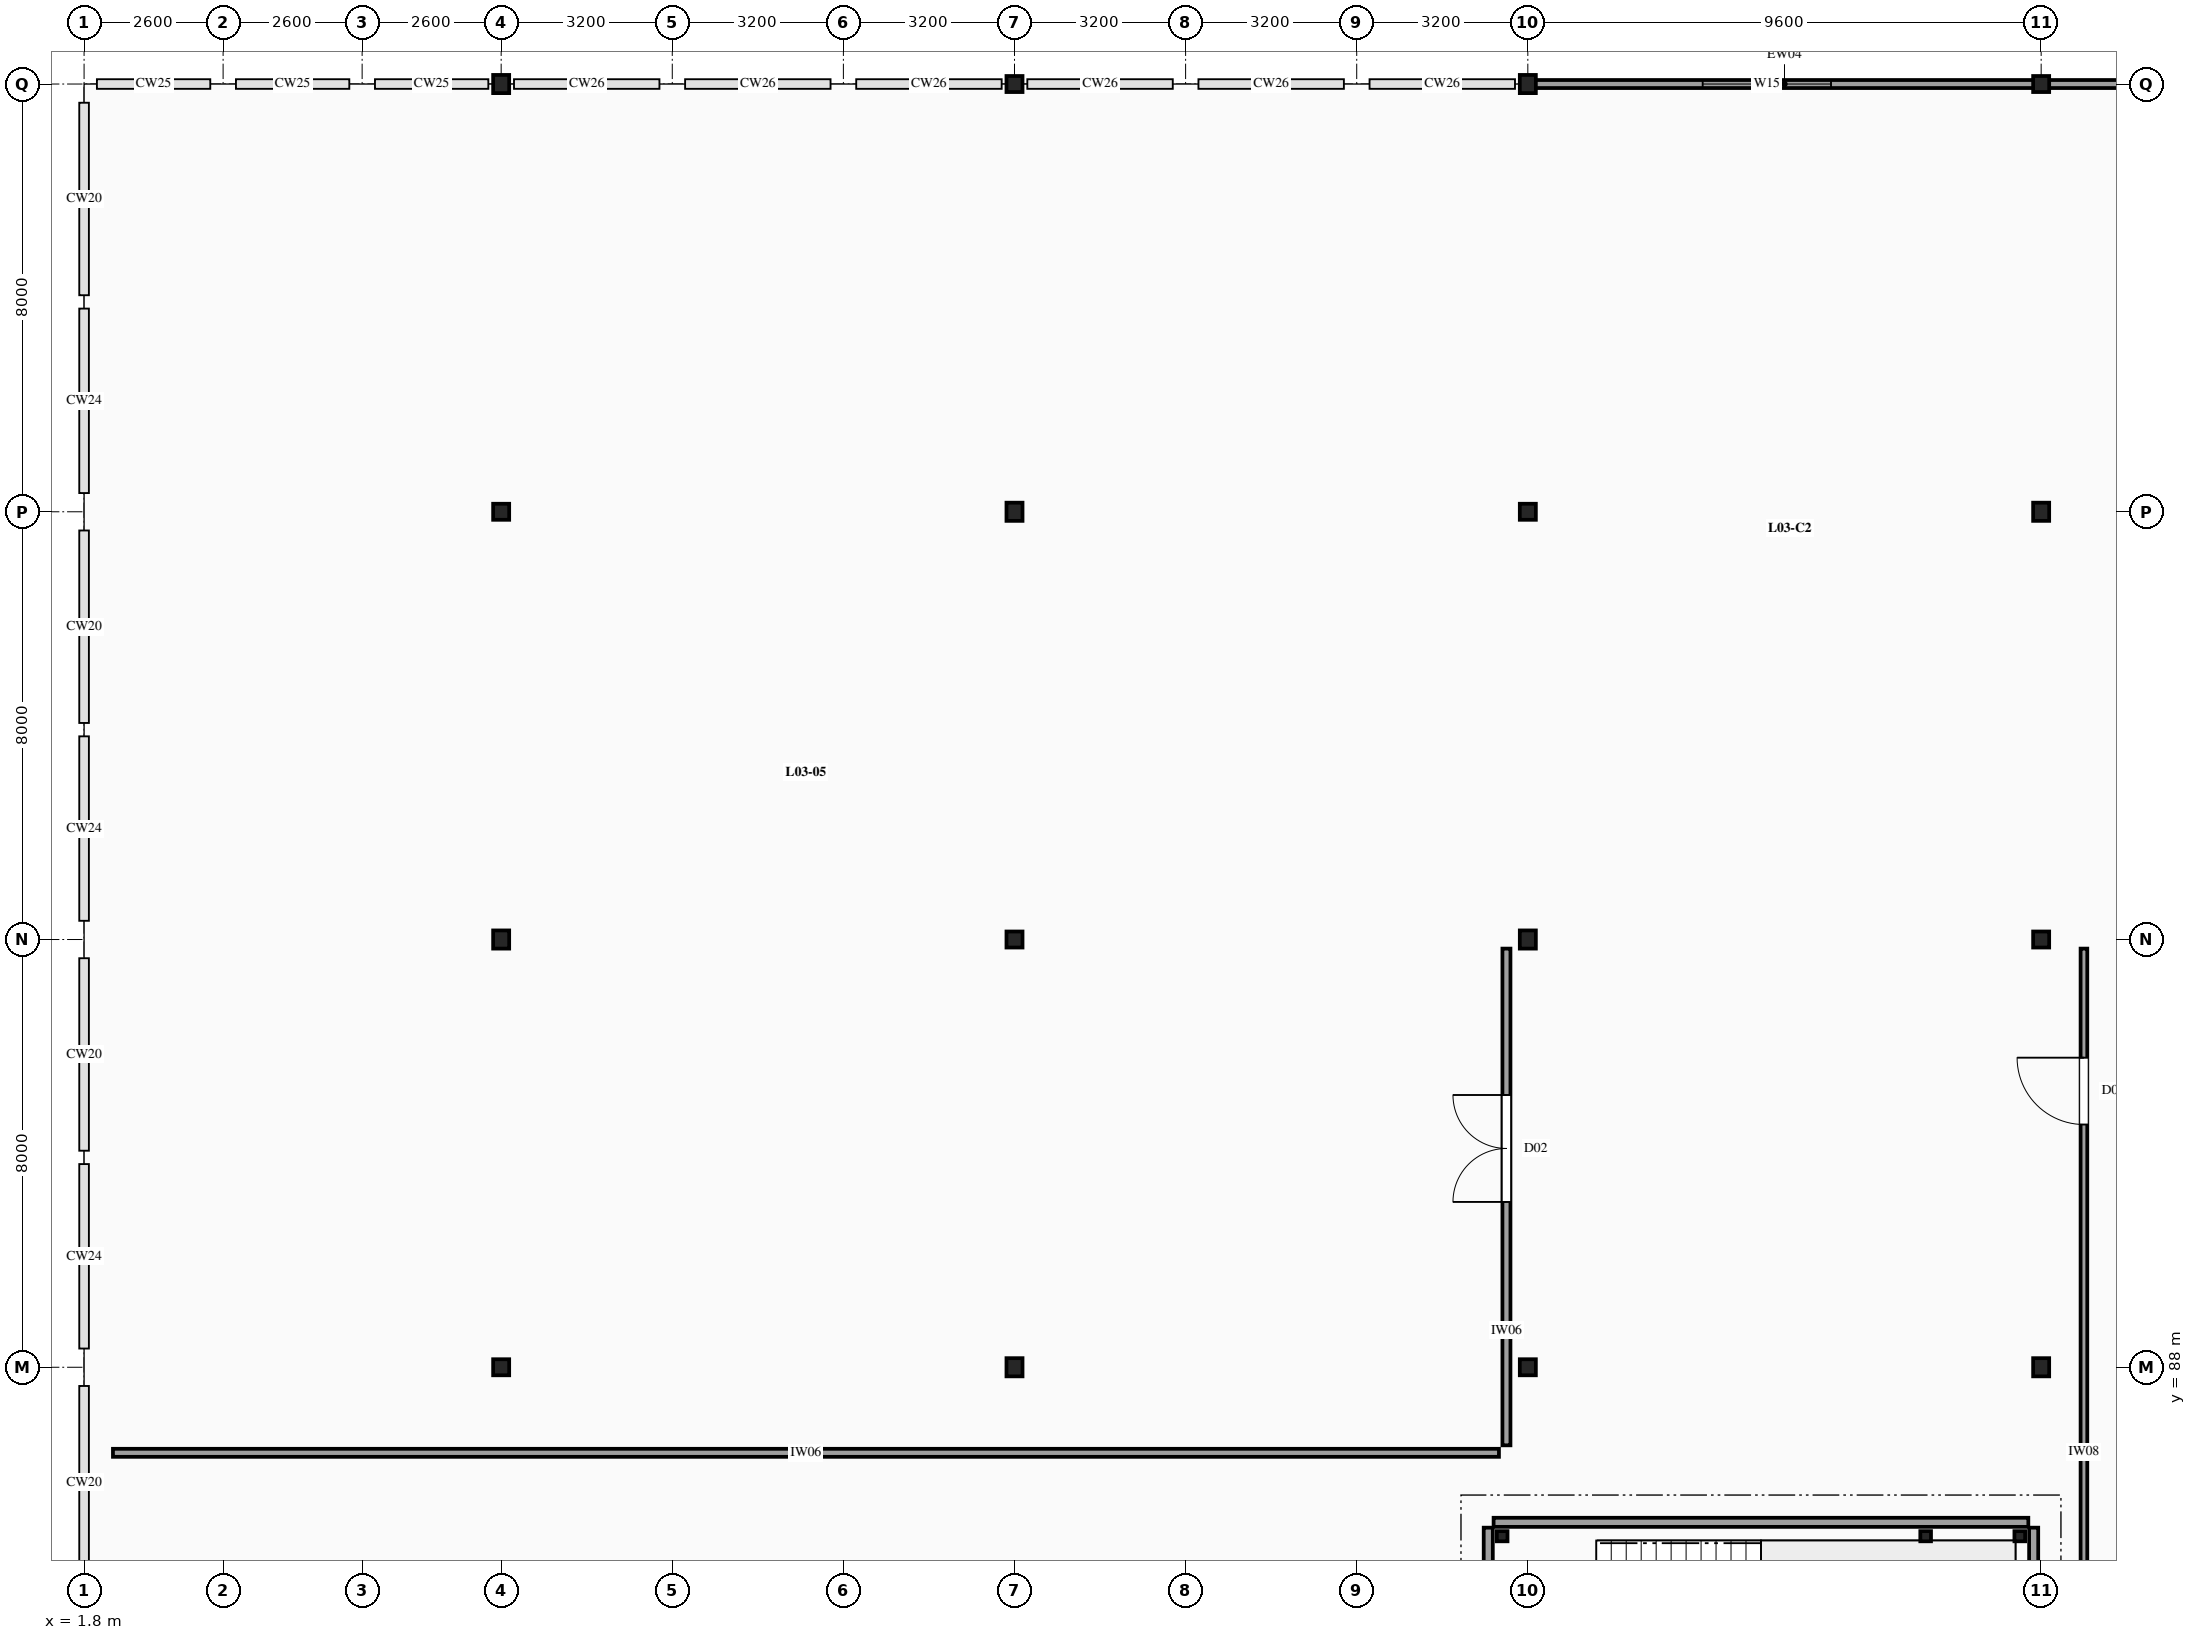
"""IFC4 building model, lengths in metres.
Left out: names, types, materials, properties, quantities, classifications, styles, units other than length and angle.
Written with IfcOpenShell. Run it as: python <this file> out.ifc"""

import sys

from ifc_helpers import new_model, si_unit, direction, frame, frame_2d, origin, origin_2d, place, context, subcontext, project, spatial, rectangle, i_section, extrude, element, fill, save


model = new_model("IFC4")
c1 = context("Model", 3, precision=1e-05, world=origin(), true_north=direction((0.0, 1.0)))
c2 = subcontext(c1, "Body", "Model", "MODEL_VIEW")
j1 = project(units=[si_unit("LENGTHUNIT", "METRE"), si_unit("PLANEANGLEUNIT", "RADIAN")], contexts=[c1])
p1 = place(None, origin())
s1 = spatial("IfcSite", under=j1, at=p1, CompositionType="ELEMENT")
p2 = place(p1, origin())
s2 = spatial("IfcBuilding", under=s1, at=p2, CompositionType="ELEMENT")
p3 = place(p2, frame((0.0, 0.0, 12.9)))
s3 = spatial("IfcBuildingStorey", under=s2, at=p3, CompositionType="ELEMENT", Elevation=12.9)
p4 = place(p3, frame((9.6, 88.0, -0.26), z_axis=(0.0, 0.0, 1.0), x_axis=(1.0, 0.0, 0.0)))
e1 = element("IfcColumn", 1, at=p4, inside=s3, PredefinedType="COLUMN", context=c2, shape_type="SweptSolid", body=[
    extrude(i_section(OverallWidth=0.3, OverallDepth=0.3, WebThickness=0.011, FlangeThickness=0.019, FilletRadius=0.027, at=origin_2d()), origin(), (0.0, 0.0, 1.0), 4.48),
])
p5 = place(p3, frame((9.6, 96.0, -0.26), z_axis=(0.0, 0.0, 1.0), x_axis=(1.0, 0.0, 0.0)))
e2 = element("IfcColumn", 2, at=p5, inside=s3, PredefinedType="COLUMN", context=c2, shape_type="SweptSolid", body=[
    extrude(i_section(OverallWidth=0.3, OverallDepth=0.34, WebThickness=0.012, FlangeThickness=0.021, FilletRadius=0.027, at=origin_2d()), origin(), (0.0, 0.0, 1.0), 4.48),
])
p6 = place(p3, frame((9.6, 104.0, -0.26), z_axis=(0.0, 0.0, 1.0), x_axis=(1.0, 0.0, 0.0)))
e3 = element("IfcColumn", 3, at=p6, inside=s3, PredefinedType="COLUMN", context=c2, shape_type="SweptSolid", body=[
    extrude(i_section(OverallWidth=0.3, OverallDepth=0.3, WebThickness=0.011, FlangeThickness=0.019, FilletRadius=0.027, at=origin_2d()), origin(), (0.0, 0.0, 1.0), 4.48),
])
for number, where, z_axis, x_axis in (
    (4, (9.6, 112.0, -0.26), (0.0, 0.0, 1.0), (1.0, 0.0, 0.0)),
    (5, (19.2, 88.0, -0.26), (0.0, 0.0, 1.0), (1.0, 0.0, 0.0)),
):
    element("IfcColumn", number, at=place(p3, frame(where, z_axis=z_axis, x_axis=x_axis)), inside=s3, PredefinedType="COLUMN", context=c2, shape_type="SweptSolid", body=[
        extrude(i_section(OverallWidth=0.3, OverallDepth=0.34, WebThickness=0.012, FlangeThickness=0.021, FilletRadius=0.027, at=origin_2d()), origin(), (0.0, 0.0, 1.0), 4.48),
    ])
p7 = place(p3, frame((19.2, 96.0, -0.26), z_axis=(0.0, 0.0, 1.0), x_axis=(1.0, 0.0, 0.0)))
e6 = element("IfcColumn", 6, at=p7, inside=s3, PredefinedType="COLUMN", context=c2, shape_type="SweptSolid", body=[
    extrude(i_section(OverallWidth=0.3, OverallDepth=0.3, WebThickness=0.011, FlangeThickness=0.019, FilletRadius=0.027, at=origin_2d()), origin(), (0.0, 0.0, 1.0), 4.48),
])
p8 = place(p3, frame((19.2, 104.0, -0.26), z_axis=(0.0, 0.0, 1.0), x_axis=(1.0, 0.0, 0.0)))
e7 = element("IfcColumn", 7, at=p8, inside=s3, PredefinedType="COLUMN", context=c2, shape_type="SweptSolid", body=[
    extrude(i_section(OverallWidth=0.3, OverallDepth=0.34, WebThickness=0.012, FlangeThickness=0.021, FilletRadius=0.027, at=origin_2d()), origin(), (0.0, 0.0, 1.0), 4.48),
])
for number, where, z_axis, x_axis in (
    (8, (19.2, 112.0, -0.26), (0.0, 0.0, 1.0), (1.0, 0.0, 0.0)),
    (9, (28.8, 88.0, -0.26), (0.0, 0.0, 1.0), (1.0, 0.0, 0.0)),
):
    element("IfcColumn", number, at=place(p3, frame(where, z_axis=z_axis, x_axis=x_axis)), inside=s3, PredefinedType="COLUMN", context=c2, shape_type="SweptSolid", body=[
        extrude(i_section(OverallWidth=0.3, OverallDepth=0.3, WebThickness=0.011, FlangeThickness=0.019, FilletRadius=0.027, at=origin_2d()), origin(), (0.0, 0.0, 1.0), 4.48),
    ])
p9 = place(p3, frame((28.8, 96.0, -0.26), z_axis=(0.0, 0.0, 1.0), x_axis=(1.0, 0.0, 0.0)))
e10 = element("IfcColumn", 10, at=p9, inside=s3, PredefinedType="COLUMN", context=c2, shape_type="SweptSolid", body=[
    extrude(i_section(OverallWidth=0.3, OverallDepth=0.34, WebThickness=0.012, FlangeThickness=0.021, FilletRadius=0.027, at=origin_2d()), origin(), (0.0, 0.0, 1.0), 4.48),
])
p10 = place(p3, frame((28.8, 104.0, -0.26), z_axis=(0.0, 0.0, 1.0), x_axis=(1.0, 0.0, 0.0)))
e11 = element("IfcColumn", 11, at=p10, inside=s3, PredefinedType="COLUMN", context=c2, shape_type="SweptSolid", body=[
    extrude(i_section(OverallWidth=0.3, OverallDepth=0.3, WebThickness=0.011, FlangeThickness=0.019, FilletRadius=0.027, at=origin_2d()), origin(), (0.0, 0.0, 1.0), 4.48),
])
for number, where, z_axis, x_axis in (
    (12, (28.8, 112.0, -0.26), (0.0, 0.0, 1.0), (1.0, 0.0, 0.0)),
    (13, (38.4, 88.0, -0.26), (0.0, 0.0, 1.0), (1.0, 0.0, 0.0)),
):
    element("IfcColumn", number, at=place(p3, frame(where, z_axis=z_axis, x_axis=x_axis)), inside=s3, PredefinedType="COLUMN", context=c2, shape_type="SweptSolid", body=[
        extrude(i_section(OverallWidth=0.3, OverallDepth=0.34, WebThickness=0.012, FlangeThickness=0.021, FilletRadius=0.027, at=origin_2d()), origin(), (0.0, 0.0, 1.0), 4.48),
    ])
p11 = place(p3, frame((38.4, 96.0, -0.26), z_axis=(0.0, 0.0, 1.0), x_axis=(1.0, 0.0, 0.0)))
e14 = element("IfcColumn", 14, at=p11, inside=s3, PredefinedType="COLUMN", context=c2, shape_type="SweptSolid", body=[
    extrude(i_section(OverallWidth=0.3, OverallDepth=0.3, WebThickness=0.011, FlangeThickness=0.019, FilletRadius=0.027, at=origin_2d()), origin(), (0.0, 0.0, 1.0), 4.48),
])
p12 = place(p3, frame((38.4, 104.0, -0.26), z_axis=(0.0, 0.0, 1.0), x_axis=(1.0, 0.0, 0.0)))
e15 = element("IfcColumn", 15, at=p12, inside=s3, PredefinedType="COLUMN", context=c2, shape_type="SweptSolid", body=[
    extrude(i_section(OverallWidth=0.3, OverallDepth=0.34, WebThickness=0.012, FlangeThickness=0.021, FilletRadius=0.027, at=origin_2d()), origin(), (0.0, 0.0, 1.0), 4.48),
])
p13 = place(p3, frame((38.4, 112.0, -0.26), z_axis=(0.0, 0.0, 1.0), x_axis=(1.0, 0.0, 0.0)))
e16 = element("IfcColumn", 16, at=p13, inside=s3, PredefinedType="COLUMN", context=c2, shape_type="SweptSolid", body=[
    extrude(i_section(OverallWidth=0.3, OverallDepth=0.3, WebThickness=0.011, FlangeThickness=0.019, FilletRadius=0.027, at=origin_2d()), origin(), (0.0, 0.0, 1.0), 4.48),
])
for number, where, z_axis, x_axis in (
    (17, (38.0, 84.84, 0.0), (0.0, 0.0, 1.0), (1.0, 0.0, 0.0)),
    (18, (28.32, 84.84, 0.0), (0.0, 0.0, 1.0), (1.0, 0.0, 0.0)),
    (19, (36.24, 84.84, 0.0), (0.0, 0.0, 1.0), (1.0, 0.0, 0.0)),
):
    element("IfcColumn", number, at=place(p3, frame(where, z_axis=z_axis, x_axis=x_axis)), inside=s3, PredefinedType="COLUMN", context=c2, shape_type="SweptSolid", body=[
        extrude(i_section(OverallWidth=0.2, OverallDepth=0.19, WebThickness=0.007, FlangeThickness=0.01, FilletRadius=0.018, at=origin_2d()), origin(), (0.0, 0.0, 1.0), 4.5),
    ])
p14 = place(p3, frame((28.82, 112.0, 0.0), z_axis=(0.0, 0.0, 1.0), x_axis=(1.0, 0.0, 0.0)))
e20 = element("IfcWall", 20, at=p14, inside=s3, PredefinedType="SOLIDWALL", context=c2, shape_type="SweptSolid", body=[
    extrude(rectangle(XDim=9.56, YDim=0.15, at=frame_2d((4.78, 0.0))), origin(), (0.0, 0.0, 1.0), 3.54),
])
p15 = place(p14, frame((3.25, 0.0, 0.95)))
e21 = element("IfcOpeningElement", 21, at=p15, cuts=e20, PredefinedType="OPENING", context=c2, shape_type="SweptSolid", body=[
    extrude(rectangle(XDim=2.4, YDim=2.2, at=frame_2d((1.2, 1.1))), frame((0.0, 0.085, 0.0), z_axis=(0.0, -1.0, 0.0), x_axis=(1.0, 0.0, 0.0)), (0.0, 0.0, 1.0), 0.17),
])
p16 = place(p3, frame((38.42, 112.0, 0.0), z_axis=(0.0, 0.0, 1.0), x_axis=(1.0, 0.0, 0.0)))
e22 = element("IfcWall", 22, at=p16, inside=s3, PredefinedType="SOLIDWALL", context=c2, shape_type="SweptSolid", body=[
    extrude(rectangle(XDim=9.56, YDim=0.15, at=frame_2d((4.78, 0.0))), origin(), (0.0, 0.0, 1.0), 3.54),
])
p17 = place(p3, frame((28.06, 80.96, 0.0), z_axis=(0.0, 0.0, 1.0), x_axis=(0.0, 1.0, 0.0)))
e23 = element("IfcWall", 23, at=p17, inside=s3, PredefinedType="SOLIDWALL", context=c2, shape_type="SweptSolid", body=[
    extrude(rectangle(XDim=4.04, YDim=0.17, at=frame_2d((2.02, 0.0))), origin(), (0.0, 0.0, 1.0), 3.38),
])
p18 = place(p17, frame((1.27, 0.0, 0.0)))
e24 = element("IfcOpeningElement", 24, at=p18, cuts=e23, PredefinedType="OPENING", context=c2, shape_type="SweptSolid", body=[
    extrude(rectangle(XDim=1.5, YDim=2.2, at=frame_2d((0.75, 1.1))), frame((0.0, 0.095, 0.0), z_axis=(0.0, -1.0, 0.0), x_axis=(1.0, 0.0, 0.0)), (0.0, 0.0, 1.0), 0.19),
])
p19 = place(p3, frame((38.26, 80.96, 0.0), z_axis=(0.0, 0.0, 1.0), x_axis=(0.0, 1.0, 0.0)))
e25 = element("IfcWall", 25, at=p19, inside=s3, PredefinedType="SOLIDWALL", context=c2, shape_type="SweptSolid", body=[
    extrude(rectangle(XDim=4.04, YDim=0.17, at=frame_2d((2.02, 0.0))), origin(), (0.0, 0.0, 1.0), 3.38),
])
p20 = place(p3, frame((28.16, 85.1, 0.0), z_axis=(0.0, 0.0, 1.0), x_axis=(1.0, 0.0, 0.0)))
e26 = element("IfcWall", 26, at=p20, inside=s3, PredefinedType="SOLIDWALL", context=c2, shape_type="SweptSolid", body=[
    extrude(rectangle(XDim=10.0, YDim=0.17, at=frame_2d((5.0, 0.0))), origin(), (0.0, 0.0, 1.0), 3.38),
])
p21 = place(p3, frame((2.34, 86.4, 0.0), z_axis=(0.0, 0.0, 1.0), x_axis=(1.0, 0.0, 0.0)))
e27 = element("IfcWall", 27, at=p21, inside=s3, PredefinedType="PARTITIONING", context=c2, shape_type="SweptSolid", body=[
    extrude(rectangle(XDim=25.92, YDim=0.15, at=frame_2d((12.96, 0.0))), origin(), (0.0, 0.0, 1.0), 3.38),
])
p22 = place(p3, frame((28.4, 86.54, 0.0), z_axis=(0.0, 0.0, 1.0), x_axis=(0.0, 1.0, 0.0)))
e28 = element("IfcWall", 28, at=p22, inside=s3, PredefinedType="PARTITIONING", context=c2, shape_type="SweptSolid", body=[
    extrude(rectangle(XDim=9.29, YDim=0.15, at=frame_2d((4.645, 0.0))), origin(), (0.0, 0.0, 1.0), 3.38),
])
p23 = place(p22, frame((4.552, 0.0, 0.0)))
e29 = element("IfcOpeningElement", 29, at=p23, cuts=e28, PredefinedType="OPENING", context=c2, shape_type="SweptSolid", body=[
    extrude(rectangle(XDim=2.0, YDim=2.6, at=frame_2d((1.0, 1.3))), frame((0.0, 0.085, 0.0), z_axis=(0.0, -1.0, 0.0), x_axis=(1.0, 0.0, 0.0)), (0.0, 0.0, 1.0), 0.17),
])
p24 = place(p3, frame((39.2, 80.54, 0.0), z_axis=(0.0, 0.0, 1.0), x_axis=(0.0, 1.0, 0.0)))
e30 = element("IfcWall", 30, at=p24, inside=s3, PredefinedType="PARTITIONING", context=c2, shape_type="SweptSolid", body=[
    extrude(rectangle(XDim=15.29, YDim=0.125, at=frame_2d((7.645, 0.0))), origin(), (0.0, 0.0, 1.0), 3.38),
])
p25 = place(p24, frame((12.0, 0.0, 0.0)))
e31 = element("IfcOpeningElement", 31, at=p25, cuts=e30, PredefinedType="OPENING", context=c2, shape_type="SweptSolid", body=[
    extrude(rectangle(XDim=1.25, YDim=2.2, at=frame_2d((0.625, 1.1))), frame((0.0, 0.073, 0.0), z_axis=(0.0, -1.0, 0.0), x_axis=(1.0, 0.0, 0.0)), (0.0, 0.0, 1.0), 0.145),
])
p26 = place(p15, origin())
e32 = element("IfcWindow", 32, at=p26, inside=s3, PartitioningType="SINGLE_PANEL", PredefinedType="WINDOW", context=c2, shape_type="SweptSolid", body=[
    extrude(rectangle(XDim=2.4, YDim=2.2, at=frame_2d((1.2, 1.1))), frame((0.0, 0.03, 0.0), z_axis=(0.0, -1.0, 0.0), x_axis=(1.0, 0.0, 0.0)), (0.0, 0.0, 1.0), 0.06),
])
fill(e21, e32)
p27 = place(p23, origin())
e33 = element("IfcDoor", 33, at=p27, inside=s3, OperationType="DOUBLE_DOOR_SINGLE_SWING", PredefinedType="DOOR", context=c2, shape_type="SweptSolid", body=[
    extrude(rectangle(XDim=2.0, YDim=2.6, at=frame_2d((1.0, 1.3))), frame((0.0, 0.025, 0.0), z_axis=(0.0, -1.0, 0.0), x_axis=(1.0, 0.0, 0.0)), (0.0, 0.0, 1.0), 0.05),
])
fill(e29, e33)
p28 = place(p25, origin())
e34 = element("IfcDoor", 34, at=p28, inside=s3, OperationType="SINGLE_SWING_RIGHT", PredefinedType="DOOR", context=c2, shape_type="SweptSolid", body=[
    extrude(rectangle(XDim=1.25, YDim=2.2, at=frame_2d((0.625, 1.1))), frame((0.0, 0.025, 0.0), z_axis=(0.0, -1.0, 0.0), x_axis=(1.0, 0.0, 0.0)), (0.0, 0.0, 1.0), 0.05),
])
fill(e31, e34)
save(model, sys.argv[1])
